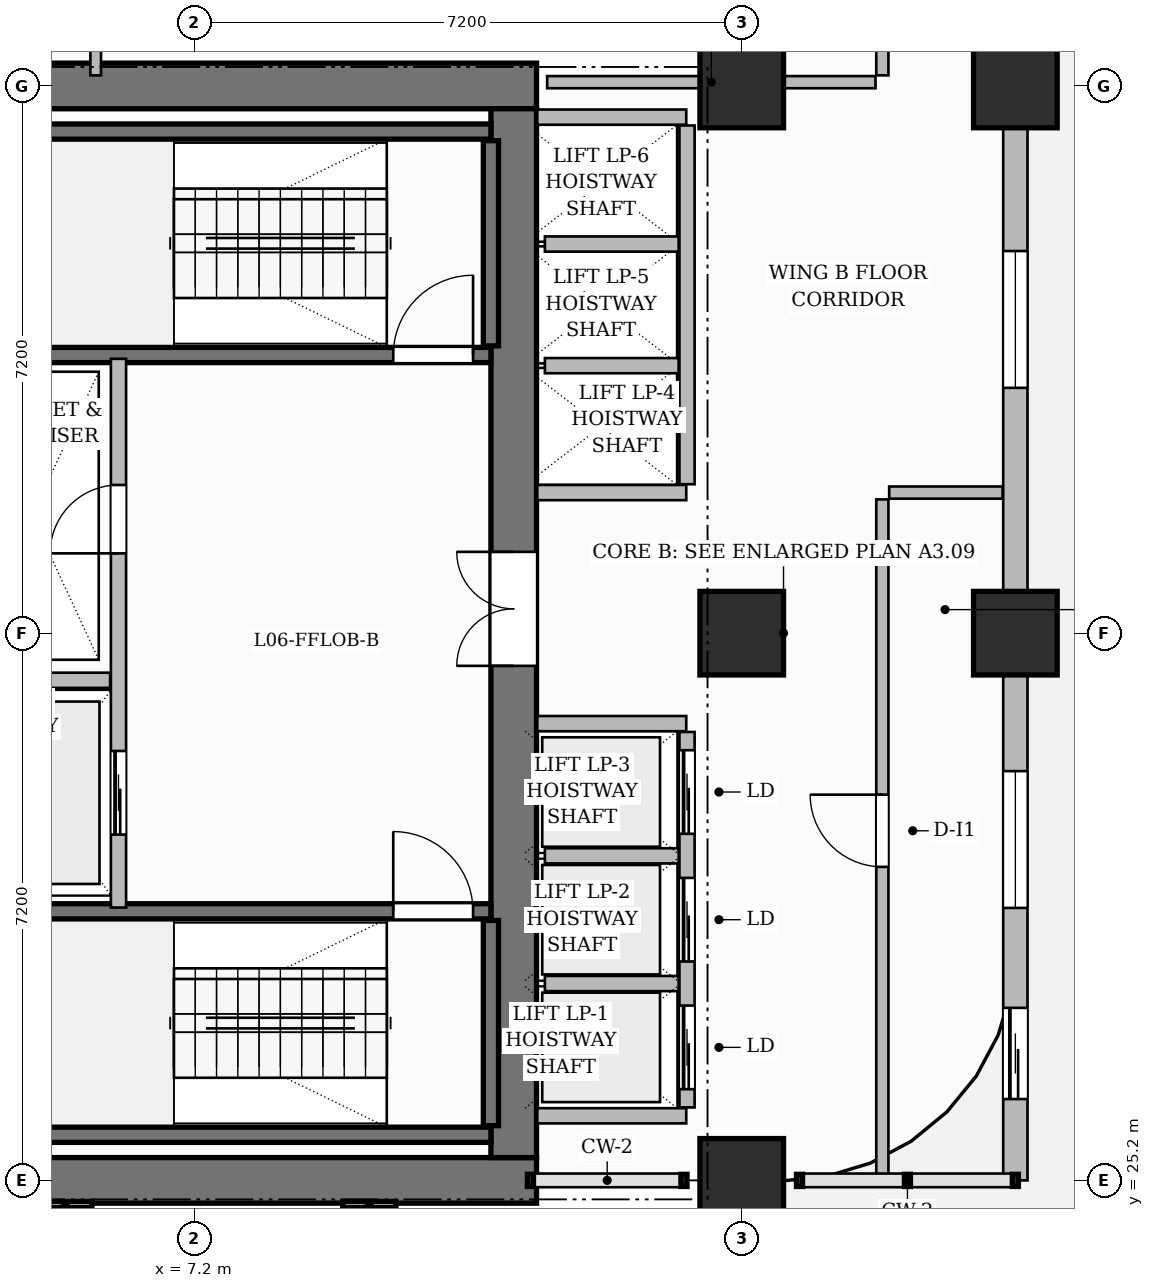
"""IFC4 building model, lengths in metres.
Left out: names, types, materials, properties, quantities, classifications, styles, units other than length and angle.
Written with IfcOpenShell. Run it as: python <this file> out.ifc"""

import sys

from ifc_helpers import new_model, si_unit, direction, frame, frame_2d, origin, origin_2d, place, context, subcontext, project, spatial, rectangle, extrude, source, transform, mapped, element, fill, save


model = new_model("IFC4")
c1 = context("Model", 3, precision=1e-05, world=origin(), true_north=direction((0.0, 1.0)))
c2 = subcontext(c1, "Body", "Model", "MODEL_VIEW")
j1 = project(units=[si_unit("LENGTHUNIT", "METRE"), si_unit("PLANEANGLEUNIT", "RADIAN")], contexts=[c1])
p1 = place(None, origin())
s1 = spatial("IfcSite", under=j1, at=p1, CompositionType="ELEMENT")
p2 = place(p1, origin())
s2 = spatial("IfcBuilding", under=s1, at=p2, CompositionType="ELEMENT")
p3 = place(p2, frame((0.0, 0.0, 32.4)))
s3 = spatial("IfcBuildingStorey", under=s2, at=p3, CompositionType="ELEMENT", Elevation=32.4)
for number, where, z_axis, x_axis in (
    (1, (3.3, 25.2, 0.0), (0.0, 0.0, 1.0), (1.0, 0.0, 0.0)),
    (2, (3.3, 39.6, 0.0), (0.0, 0.0, 1.0), (1.0, 0.0, 0.0)),
):
    element("IfcWall", number, at=place(p3, frame(where, z_axis=z_axis, x_axis=x_axis)), inside=s3, PredefinedType="SHEAR", context=c2, shape_type="SweptSolid", body=[
        extrude(rectangle(XDim=8.4, YDim=0.6, at=frame_2d((4.2, 0.0))), origin(), (0.0, 0.0, 1.0), 3.7),
    ])
p4 = place(p3, frame((11.4, 25.5, 0.0), z_axis=(0.0, 0.0, 1.0), x_axis=(0.0, 1.0, 0.0)))
e3 = element("IfcWall", 3, at=p4, inside=s3, PredefinedType="SHEAR", context=c2, shape_type="SweptSolid", body=[
    extrude(rectangle(XDim=13.8, YDim=0.6, at=frame_2d((6.9, 0.0))), origin(), (0.0, 0.0, 1.0), 3.7),
])
p5 = place(p4, frame((6.47, 0.0, 0.0)))
e4 = element("IfcOpeningElement", 4, at=p5, cuts=e3, PredefinedType="OPENING", context=c2, shape_type="SweptSolid", body=[
    extrude(rectangle(XDim=1.5, YDim=2.2, at=frame_2d((0.75, 1.1))), frame((0.0, 0.31, 0.0), z_axis=(0.0, -1.0, 0.0), x_axis=(1.0, 0.0, 0.0)), (0.0, 0.0, 1.0), 0.62),
])
m1 = source(origin(), c2, "Body", "SweptSolid", [
    extrude(rectangle(XDim=1.1, YDim=1.1, at=origin_2d()), origin(), (0.0, 0.0, 1.0), 3.7),
])
for number, where, z_axis, x_axis in (
    (5, (14.4, 25.2, 0.0), (0.0, 0.0, 1.0), (1.0, 0.0, 0.0)),
    (6, (14.4, 32.4, 0.0), (0.0, 0.0, 1.0), (1.0, 0.0, 0.0)),
    (7, (14.4, 39.6, 0.0), (0.0, 0.0, 1.0), (1.0, 0.0, 0.0)),
    (8, (18.0, 32.4, 0.0), (0.0, 0.0, 1.0), (1.0, 0.0, 0.0)),
    (9, (18.0, 39.6, 0.0), (0.0, 0.0, 1.0), (1.0, 0.0, 0.0)),
):
    element("IfcColumn", number, at=place(p3, frame(where, z_axis=z_axis, x_axis=x_axis)), inside=s3, PredefinedType="COLUMN", context=c2, shape_type="MappedRepresentation", body=[
        mapped(m1, transform((0.0, 0.0, 0.0), scale=1.0)),
    ])
p6 = place(p3, frame((4.0, 25.8, 0.0), z_axis=(0.0, 0.0, 1.0), x_axis=(1.0, 0.0, 0.0)))
e10 = element("IfcWall", 10, at=p6, inside=s3, PredefinedType="SHEAR", context=c2, shape_type="SweptSolid", body=[
    extrude(rectangle(XDim=7.1, YDim=0.2, at=frame_2d((3.55, 0.0))), origin(), (0.0, 0.0, 1.0), 3.7),
])
p7 = place(p3, frame((11.1, 25.92, 0.0), z_axis=(0.0, 0.0, 1.0), x_axis=(0.0, 1.0, 0.0)))
e11 = element("IfcWall", 11, at=p7, inside=s3, PredefinedType="SHEAR", context=c2, shape_type="SweptSolid", body=[
    extrude(rectangle(XDim=2.7, YDim=0.2, at=frame_2d((1.35, 0.0))), origin(), (0.0, 0.0, 1.0), 3.7),
])
p8 = place(p3, frame((4.0, 28.74, 0.0), z_axis=(0.0, 0.0, 1.0), x_axis=(1.0, 0.0, 0.0)))
e12 = element("IfcWall", 12, at=p8, inside=s3, PredefinedType="SHEAR", context=c2, shape_type="SweptSolid", body=[
    extrude(rectangle(XDim=7.1, YDim=0.2, at=frame_2d((3.55, 0.0))), origin(), (0.0, 0.0, 1.0), 3.7),
])
p9 = place(p8, frame((5.815, 0.0, 0.0)))
e13 = element("IfcOpeningElement", 13, at=p9, cuts=e12, PredefinedType="OPENING", context=c2, shape_type="SweptSolid", body=[
    extrude(rectangle(XDim=1.05, YDim=2.2, at=frame_2d((0.525, 1.1))), frame((0.0, 0.11, 0.0), z_axis=(0.0, -1.0, 0.0), x_axis=(1.0, 0.0, 0.0)), (0.0, 0.0, 1.0), 0.22),
])
p10 = place(p3, frame((4.0, 39.0, 0.0), z_axis=(0.0, 0.0, 1.0), x_axis=(1.0, 0.0, 0.0)))
e14 = element("IfcWall", 14, at=p10, inside=s3, PredefinedType="SHEAR", context=c2, shape_type="SweptSolid", body=[
    extrude(rectangle(XDim=7.1, YDim=0.2, at=frame_2d((3.55, 0.0))), origin(), (0.0, 0.0, 1.0), 3.7),
])
p11 = place(p3, frame((11.1, 36.18, 0.0), z_axis=(0.0, 0.0, 1.0), x_axis=(0.0, 1.0, 0.0)))
e15 = element("IfcWall", 15, at=p11, inside=s3, PredefinedType="SHEAR", context=c2, shape_type="SweptSolid", body=[
    extrude(rectangle(XDim=2.7, YDim=0.2, at=frame_2d((1.35, 0.0))), origin(), (0.0, 0.0, 1.0), 3.7),
])
p12 = place(p3, frame((4.0, 36.06, 0.0), z_axis=(0.0, 0.0, 1.0), x_axis=(1.0, 0.0, 0.0)))
e16 = element("IfcWall", 16, at=p12, inside=s3, PredefinedType="SHEAR", context=c2, shape_type="SweptSolid", body=[
    extrude(rectangle(XDim=7.1, YDim=0.2, at=frame_2d((3.55, 0.0))), origin(), (0.0, 0.0, 1.0), 3.7),
])
p13 = place(p12, frame((5.815, 0.0, 0.0)))
e17 = element("IfcOpeningElement", 17, at=p13, cuts=e16, PredefinedType="OPENING", context=c2, shape_type="SweptSolid", body=[
    extrude(rectangle(XDim=1.05, YDim=2.2, at=frame_2d((0.525, 1.1))), frame((0.0, 0.11, 0.0), z_axis=(0.0, -1.0, 0.0), x_axis=(1.0, 0.0, 0.0)), (0.0, 0.0, 1.0), 0.22),
])
p14 = place(p3, frame((6.2, 28.79, 0.0), z_axis=(0.0, 0.0, 1.0), x_axis=(0.0, 1.0, 0.0)))
e18 = element("IfcWall", 18, at=p14, inside=s3, PredefinedType="PARTITIONING", context=c2, shape_type="SweptSolid", body=[
    extrude(rectangle(XDim=7.22, YDim=0.2, at=frame_2d((3.61, 0.0))), origin(), (0.0, 0.0, 1.0), 3.45),
])
p15 = place(p14, frame((4.66, 0.0, 0.0)))
e19 = element("IfcOpeningElement", 19, at=p15, cuts=e18, PredefinedType="OPENING", context=c2, shape_type="SweptSolid", body=[
    extrude(rectangle(XDim=0.9, YDim=2.1, at=frame_2d((0.45, 1.05))), frame((0.0, 0.11, 0.0), z_axis=(0.0, -1.0, 0.0), x_axis=(1.0, 0.0, 0.0)), (0.0, 0.0, 1.0), 0.22),
])
p16 = place(p14, frame((0.96, 0.0, 0.0)))
e20 = element("IfcOpeningElement", 20, at=p16, cuts=e18, PredefinedType="OPENING", context=c2, shape_type="SweptSolid", body=[
    extrude(rectangle(XDim=1.1, YDim=2.2, at=frame_2d((0.55, 1.1))), frame((0.0, 0.11, 0.0), z_axis=(0.0, -1.0, 0.0), x_axis=(1.0, 0.0, 0.0)), (0.0, 0.0, 1.0), 0.22),
])
p17 = place(p3, frame((3.96, 31.78, 0.0), z_axis=(0.0, 0.0, 1.0), x_axis=(1.0, 0.0, 0.0)))
e21 = element("IfcWall", 21, at=p17, inside=s3, PredefinedType="PARTITIONING", context=c2, shape_type="SweptSolid", body=[
    extrude(rectangle(XDim=2.13, YDim=0.2, at=frame_2d((1.065, 0.0))), origin(), (0.0, 0.0, 1.0), 3.45),
])
for number, where, z_axis, x_axis in (
    (22, (11.71, 26.05, 0.0), (0.0, 0.0, 1.0), (1.0, 0.0, 0.0)),
    (23, (11.71, 31.21, 0.0), (0.0, 0.0, 1.0), (1.0, 0.0, 0.0)),
):
    element("IfcWall", number, at=place(p3, frame(where, z_axis=z_axis, x_axis=x_axis)), inside=s3, PredefinedType="PARTITIONING", context=c2, shape_type="SweptSolid", body=[
        extrude(rectangle(XDim=1.96, YDim=0.2, at=frame_2d((0.98, 0.0))), origin(), (0.0, 0.0, 1.0), 3.45),
    ])
p18 = place(p3, frame((13.68, 26.16, 0.0), z_axis=(0.0, 0.0, 1.0), x_axis=(0.0, 1.0, 0.0)))
e24 = element("IfcWall", 24, at=p18, inside=s3, PredefinedType="PARTITIONING", context=c2, shape_type="SweptSolid", body=[
    extrude(rectangle(XDim=4.94, YDim=0.2, at=frame_2d((2.47, 0.0))), origin(), (0.0, 0.0, 1.0), 3.45),
])
p19 = place(p18, frame((0.24, 0.0, 0.0)))
e25 = element("IfcOpeningElement", 25, at=p19, cuts=e24, PredefinedType="OPENING", context=c2, shape_type="SweptSolid", body=[
    extrude(rectangle(XDim=1.1, YDim=2.2, at=frame_2d((0.55, 1.1))), frame((0.0, 0.11, 0.0), z_axis=(0.0, -1.0, 0.0), x_axis=(1.0, 0.0, 0.0)), (0.0, 0.0, 1.0), 0.22),
])
p20 = place(p18, frame((1.92, 0.0, 0.0)))
e26 = element("IfcOpeningElement", 26, at=p20, cuts=e24, PredefinedType="OPENING", context=c2, shape_type="SweptSolid", body=[
    extrude(rectangle(XDim=1.1, YDim=2.2, at=frame_2d((0.55, 1.1))), frame((0.0, 0.11, 0.0), z_axis=(0.0, -1.0, 0.0), x_axis=(1.0, 0.0, 0.0)), (0.0, 0.0, 1.0), 0.22),
])
p21 = place(p18, frame((3.6, 0.0, 0.0)))
e27 = element("IfcOpeningElement", 27, at=p21, cuts=e24, PredefinedType="OPENING", context=c2, shape_type="SweptSolid", body=[
    extrude(rectangle(XDim=1.1, YDim=2.2, at=frame_2d((0.55, 1.1))), frame((0.0, 0.11, 0.0), z_axis=(0.0, -1.0, 0.0), x_axis=(1.0, 0.0, 0.0)), (0.0, 0.0, 1.0), 0.22),
])
for number, where, z_axis, x_axis in (
    (28, (11.81, 27.79, 0.0), (0.0, 0.0, 1.0), (1.0, 0.0, 0.0)),
    (29, (11.81, 29.47, 0.0), (0.0, 0.0, 1.0), (1.0, 0.0, 0.0)),
):
    element("IfcWall", number, at=place(p3, frame(where, z_axis=z_axis, x_axis=x_axis)), inside=s3, PredefinedType="PARTITIONING", context=c2, shape_type="SweptSolid", body=[
        extrude(rectangle(XDim=1.76, YDim=0.2, at=frame_2d((0.88, 0.0))), origin(), (0.0, 0.0, 1.0), 3.45),
    ])
for number, where, z_axis, x_axis in (
    (30, (11.71, 34.25, 0.0), (0.0, 0.0, 1.0), (1.0, 0.0, 0.0)),
    (31, (11.71, 39.19, 0.0), (0.0, 0.0, 1.0), (1.0, 0.0, 0.0)),
):
    element("IfcWall", number, at=place(p3, frame(where, z_axis=z_axis, x_axis=x_axis)), inside=s3, PredefinedType="PARTITIONING", context=c2, shape_type="SweptSolid", body=[
        extrude(rectangle(XDim=1.96, YDim=0.2, at=frame_2d((0.98, 0.0))), origin(), (0.0, 0.0, 1.0), 3.45),
    ])
p22 = place(p3, frame((13.68, 34.36, 0.0), z_axis=(0.0, 0.0, 1.0), x_axis=(0.0, 1.0, 0.0)))
e32 = element("IfcWall", 32, at=p22, inside=s3, PredefinedType="PARTITIONING", context=c2, shape_type="SweptSolid", body=[
    extrude(rectangle(XDim=4.72, YDim=0.2, at=frame_2d((2.36, 0.0))), origin(), (0.0, 0.0, 1.0), 3.45),
])
for number, where, z_axis, x_axis in (
    (33, (11.81, 35.92, 0.0), (0.0, 0.0, 1.0), (1.0, 0.0, 0.0)),
    (34, (11.81, 37.52, 0.0), (0.0, 0.0, 1.0), (1.0, 0.0, 0.0)),
):
    element("IfcWall", number, at=place(p3, frame(where, z_axis=z_axis, x_axis=x_axis)), inside=s3, PredefinedType="PARTITIONING", context=c2, shape_type="SweptSolid", body=[
        extrude(rectangle(XDim=1.76, YDim=0.2, at=frame_2d((0.88, 0.0))), origin(), (0.0, 0.0, 1.0), 3.45),
    ])
p23 = place(p3, frame((16.25, 25.228, 0.0), z_axis=(0.0, 0.0, 1.0), x_axis=(0.0, 1.0, 0.0)))
e35 = element("IfcWall", 35, at=p23, inside=s3, PredefinedType="PARTITIONING", context=c2, shape_type="SweptSolid", body=[
    extrude(rectangle(XDim=8.932, YDim=0.16, at=frame_2d((4.466, 0.0))), origin(), (0.0, 0.0, 1.0), 3.45),
])
p24 = place(p23, frame((4.097, 0.0, 0.0)))
e36 = element("IfcOpeningElement", 36, at=p24, cuts=e35, PredefinedType="OPENING", context=c2, shape_type="SweptSolid", body=[
    extrude(rectangle(XDim=0.95, YDim=2.15, at=frame_2d((0.475, 1.075))), frame((0.0, 0.09, 0.0), z_axis=(0.0, -1.0, 0.0), x_axis=(1.0, 0.0, 0.0)), (0.0, 0.0, 1.0), 0.18),
])
p25 = place(p3, frame((16.34, 34.25, 0.0), z_axis=(0.0, 0.0, 1.0), x_axis=(1.0, 0.0, 0.0)))
e37 = element("IfcWall", 37, at=p25, inside=s3, PredefinedType="PARTITIONING", context=c2, shape_type="SweptSolid", body=[
    extrude(rectangle(XDim=1.492, YDim=0.16, at=frame_2d((0.746, 0.0))), origin(), (0.0, 0.0, 1.0), 3.45),
])
p26 = place(p3, frame((16.25, 39.74, 0.0), z_axis=(0.0, 0.0, 1.0), x_axis=(0.0, 1.0, 0.0)))
e38 = element("IfcWall", 38, at=p26, inside=s3, PredefinedType="PARTITIONING", context=c2, shape_type="SweptSolid", body=[
    extrude(rectangle(XDim=6.892, YDim=0.16, at=frame_2d((3.446, 0.0))), origin(), (0.0, 0.0, 1.0), 3.45),
])
p27 = place(p26, frame((1.035, 0.0, 0.0)))
e39 = element("IfcOpeningElement", 39, at=p27, cuts=e38, PredefinedType="OPENING", context=c2, shape_type="SweptSolid", body=[
    extrude(rectangle(XDim=1.0, YDim=2.2, at=frame_2d((0.5, 1.1))), frame((0.0, 0.09, 0.0), z_axis=(0.0, -1.0, 0.0), x_axis=(1.0, 0.0, 0.0)), (0.0, 0.0, 1.0), 0.18),
])
p28 = place(p26, frame((4.51, 0.0, 0.0)))
e40 = element("IfcOpeningElement", 40, at=p28, cuts=e38, PredefinedType="OPENING", context=c2, shape_type="SweptSolid", body=[
    extrude(rectangle(XDim=1.05, YDim=2.25, at=frame_2d((0.525, 1.125))), frame((0.0, 0.09, 0.0), z_axis=(0.0, -1.0, 0.0), x_axis=(1.0, 0.0, 0.0)), (0.0, 0.0, 1.0), 0.18),
])
p29 = place(p3, frame((11.84, 39.65, 0.0), z_axis=(0.0, 0.0, 1.0), x_axis=(1.0, 0.0, 0.0)))
e41 = element("IfcWall", 41, at=p29, inside=s3, PredefinedType="PARTITIONING", context=c2, shape_type="SweptSolid", body=[
    extrude(rectangle(XDim=4.32, YDim=0.16, at=frame_2d((2.16, 0.0))), origin(), (0.0, 0.0, 1.0), 2.885),
])
p30 = place(p3, frame((5.9, 39.74, 0.0), z_axis=(0.0, 0.0, 1.0), x_axis=(0.0, 1.0, 0.0)))
e42 = element("IfcWall", 42, at=p30, inside=s3, PredefinedType="PARTITIONING", context=c2, shape_type="SweptSolid", body=[
    extrude(rectangle(XDim=1.67, YDim=0.14, at=frame_2d((0.835, 0.0))), origin(), (0.0, 0.0, 1.0), 3.45),
])
p31 = place(p30, frame((0.41, 0.0, 0.0)))
e43 = element("IfcOpeningElement", 43, at=p31, cuts=e42, PredefinedType="OPENING", context=c2, shape_type="SweptSolid", body=[
    extrude(rectangle(XDim=0.85, YDim=2.1, at=frame_2d((0.425, 1.05))), frame((0.0, 0.08, 0.0), z_axis=(0.0, -1.0, 0.0), x_axis=(1.0, 0.0, 0.0)), (0.0, 0.0, 1.0), 0.16),
])
p32 = place(p3, frame((18.0, 25.2, 0.0), z_axis=(0.0, 0.0, 1.0), x_axis=(0.0, 1.0, 0.0)))
e44 = element("IfcWall", 44, at=p32, inside=s3, PredefinedType="SOLIDWALL", context=c2, shape_type="SweptSolid", body=[
    extrude(rectangle(XDim=21.55, YDim=0.32, at=frame_2d((10.775, 0.0))), origin(), (0.0, 0.0, 1.0), 3.45),
])
p33 = place(p32, frame((18.5, 0.0, 0.0)))
e45 = element("IfcOpeningElement", 45, at=p33, cuts=e44, PredefinedType="OPENING", context=c2, shape_type="SweptSolid", body=[
    extrude(rectangle(XDim=1.2, YDim=2.2, at=frame_2d((0.6, 1.1))), frame((0.0, 0.17, 0.0), z_axis=(0.0, -1.0, 0.0), x_axis=(1.0, 0.0, 0.0)), (0.0, 0.0, 1.0), 0.34),
])
p34 = place(p32, frame((1.07, 0.0, 0.0)))
e46 = element("IfcOpeningElement", 46, at=p34, cuts=e44, PredefinedType="OPENING", context=c2, shape_type="SweptSolid", body=[
    extrude(rectangle(XDim=1.2, YDim=2.2, at=frame_2d((0.6, 1.1))), frame((0.0, 0.17, 0.0), z_axis=(0.0, -1.0, 0.0), x_axis=(1.0, 0.0, 0.0)), (0.0, 0.0, 1.0), 0.34),
])
p35 = place(p32, frame((3.585, 0.0, 0.8)))
e47 = element("IfcOpeningElement", 47, at=p35, cuts=e44, PredefinedType="OPENING", context=c2, shape_type="SweptSolid", body=[
    extrude(rectangle(XDim=1.8, YDim=1.85, at=frame_2d((0.9, 0.925))), frame((0.0, 0.17, 0.0), z_axis=(0.0, -1.0, 0.0), x_axis=(1.0, 0.0, 0.0)), (0.0, 0.0, 1.0), 0.34),
])
p36 = place(p32, frame((10.428, 0.0, 0.8)))
e48 = element("IfcOpeningElement", 48, at=p36, cuts=e44, PredefinedType="OPENING", context=c2, shape_type="SweptSolid", body=[
    extrude(rectangle(XDim=1.8, YDim=1.85, at=frame_2d((0.9, 0.925))), frame((0.0, 0.17, 0.0), z_axis=(0.0, -1.0, 0.0), x_axis=(1.0, 0.0, 0.0)), (0.0, 0.0, 1.0), 0.34),
])
p37 = place(p32, frame((15.8, 0.0, 0.8)))
e49 = element("IfcOpeningElement", 49, at=p37, cuts=e44, PredefinedType="OPENING", context=c2, shape_type="SweptSolid", body=[
    extrude(rectangle(XDim=1.8, YDim=1.85, at=frame_2d((0.9, 0.925))), frame((0.0, 0.17, 0.0), z_axis=(0.0, -1.0, 0.0), x_axis=(1.0, 0.0, 0.0)), (0.0, 0.0, 1.0), 0.34),
])
m2 = source(origin(), c2, "Body", "SweptSolid", [
    extrude(rectangle(XDim=1.05, YDim=2.2, at=frame_2d((0.525, 1.1))), frame((0.0, 0.025, 0.0), z_axis=(0.0, -1.0, 0.0), x_axis=(1.0, 0.0, 0.0)), (0.0, 0.0, 1.0), 0.05),
])
p38 = place(p9, origin())
e50 = element("IfcDoor", 50, at=p38, inside=s3, OperationType="SINGLE_SWING_LEFT", PredefinedType="DOOR", context=c2, shape_type="MappedRepresentation", body=[
    mapped(m2, transform((0.0, 0.0, 0.0), scale=1.0)),
])
fill(e13, e50)
p39 = place(p13, origin())
e51 = element("IfcDoor", 51, at=p39, inside=s3, OperationType="SINGLE_SWING_RIGHT", PredefinedType="DOOR", context=c2, shape_type="MappedRepresentation", body=[
    mapped(m2, transform((0.0, 0.0, 0.0), scale=1.0)),
])
fill(e17, e51)
m3 = source(origin(), c2, "Body", "SweptSolid", [
    extrude(rectangle(XDim=0.9, YDim=2.1, at=frame_2d((0.45, 1.05))), frame((0.0, 0.025, 0.0), z_axis=(0.0, -1.0, 0.0), x_axis=(1.0, 0.0, 0.0)), (0.0, 0.0, 1.0), 0.05),
])
p40 = place(p15, origin())
e52 = element("IfcDoor", 52, at=p40, inside=s3, OperationType="SINGLE_SWING_LEFT", PredefinedType="DOOR", context=c2, shape_type="MappedRepresentation", body=[
    mapped(m3, transform((0.0, 0.0, 0.0), scale=1.0)),
])
fill(e19, e52)
m4 = source(origin(), c2, "Body", "SweptSolid", [
    extrude(rectangle(XDim=1.5, YDim=2.2, at=frame_2d((0.75, 1.1))), frame((0.0, 0.025, 0.0), z_axis=(0.0, -1.0, 0.0), x_axis=(1.0, 0.0, 0.0)), (0.0, 0.0, 1.0), 0.05),
])
p41 = place(p5, origin())
e53 = element("IfcDoor", 53, at=p41, inside=s3, OperationType="DOUBLE_DOOR_SINGLE_SWING", PredefinedType="DOOR", context=c2, shape_type="MappedRepresentation", body=[
    mapped(m4, transform((0.0, 0.0, 0.0), scale=1.0)),
])
fill(e4, e53)
m5 = source(origin(), c2, "Body", "SweptSolid", [
    extrude(rectangle(XDim=0.95, YDim=2.15, at=frame_2d((0.475, 1.075))), frame((0.0, 0.025, 0.0), z_axis=(0.0, -1.0, 0.0), x_axis=(1.0, 0.0, 0.0)), (0.0, 0.0, 1.0), 0.05),
])
p42 = place(p24, origin())
e54 = element("IfcDoor", 54, at=p42, inside=s3, OperationType="SINGLE_SWING_RIGHT", PredefinedType="DOOR", context=c2, shape_type="MappedRepresentation", body=[
    mapped(m5, transform((0.0, 0.0, 0.0), scale=1.0)),
])
fill(e36, e54)
m6 = source(origin(), c2, "Body", "SweptSolid", [
    extrude(rectangle(XDim=1.1, YDim=2.2, at=frame_2d((0.55, 1.1))), frame((0.0, 0.025, 0.0), z_axis=(0.0, -1.0, 0.0), x_axis=(1.0, 0.0, 0.0)), (0.0, 0.0, 1.0), 0.05),
])
p43 = place(p16, origin())
e55 = element("IfcDoor", 55, at=p43, inside=s3, OperationType="SLIDING_TO_LEFT", PredefinedType="DOOR", context=c2, shape_type="MappedRepresentation", body=[
    mapped(m6, transform((0.0, 0.0, 0.0), scale=1.0)),
])
fill(e20, e55)
p44 = place(p19, origin())
e56 = element("IfcDoor", 56, at=p44, inside=s3, OperationType="SLIDING_TO_LEFT", PredefinedType="DOOR", context=c2, shape_type="MappedRepresentation", body=[
    mapped(m6, transform((0.0, 0.0, 0.0), scale=1.0)),
])
fill(e25, e56)
p45 = place(p20, origin())
e57 = element("IfcDoor", 57, at=p45, inside=s3, OperationType="SLIDING_TO_LEFT", PredefinedType="DOOR", context=c2, shape_type="MappedRepresentation", body=[
    mapped(m6, transform((0.0, 0.0, 0.0), scale=1.0)),
])
fill(e26, e57)
p46 = place(p21, origin())
e58 = element("IfcDoor", 58, at=p46, inside=s3, OperationType="SLIDING_TO_LEFT", PredefinedType="DOOR", context=c2, shape_type="MappedRepresentation", body=[
    mapped(m6, transform((0.0, 0.0, 0.0), scale=1.0)),
])
fill(e27, e58)
m7 = source(origin(), c2, "Body", "SweptSolid", [
    extrude(rectangle(XDim=1.2, YDim=2.2, at=frame_2d((0.6, 1.1))), frame((0.0, 0.025, 0.0), z_axis=(0.0, -1.0, 0.0), x_axis=(1.0, 0.0, 0.0)), (0.0, 0.0, 1.0), 0.05),
])
p47 = place(p34, origin())
e59 = element("IfcDoor", 59, at=p47, inside=s3, OperationType="SLIDING_TO_LEFT", PredefinedType="DOOR", context=c2, shape_type="MappedRepresentation", body=[
    mapped(m7, transform((0.0, 0.0, 0.0), scale=1.0)),
])
fill(e46, e59)
m8 = source(origin(), c2, "Body", "SweptSolid", [
    extrude(rectangle(XDim=1.8, YDim=1.85, at=frame_2d((0.9, 0.925))), frame((0.0, 0.03, 0.0), z_axis=(0.0, -1.0, 0.0), x_axis=(1.0, 0.0, 0.0)), (0.0, 0.0, 1.0), 0.06),
])
p48 = place(p35, origin())
e60 = element("IfcWindow", 60, at=p48, inside=s3, PartitioningType="DOUBLE_PANEL_VERTICAL", PredefinedType="WINDOW", context=c2, shape_type="MappedRepresentation", body=[
    mapped(m8, transform((0.0, 0.0, 0.0), scale=1.0)),
])
fill(e47, e60)
p49 = place(p36, origin())
e61 = element("IfcWindow", 61, at=p49, inside=s3, PartitioningType="DOUBLE_PANEL_VERTICAL", PredefinedType="WINDOW", context=c2, shape_type="MappedRepresentation", body=[
    mapped(m8, transform((0.0, 0.0, 0.0), scale=1.0)),
])
fill(e48, e61)
save(model, sys.argv[1])
